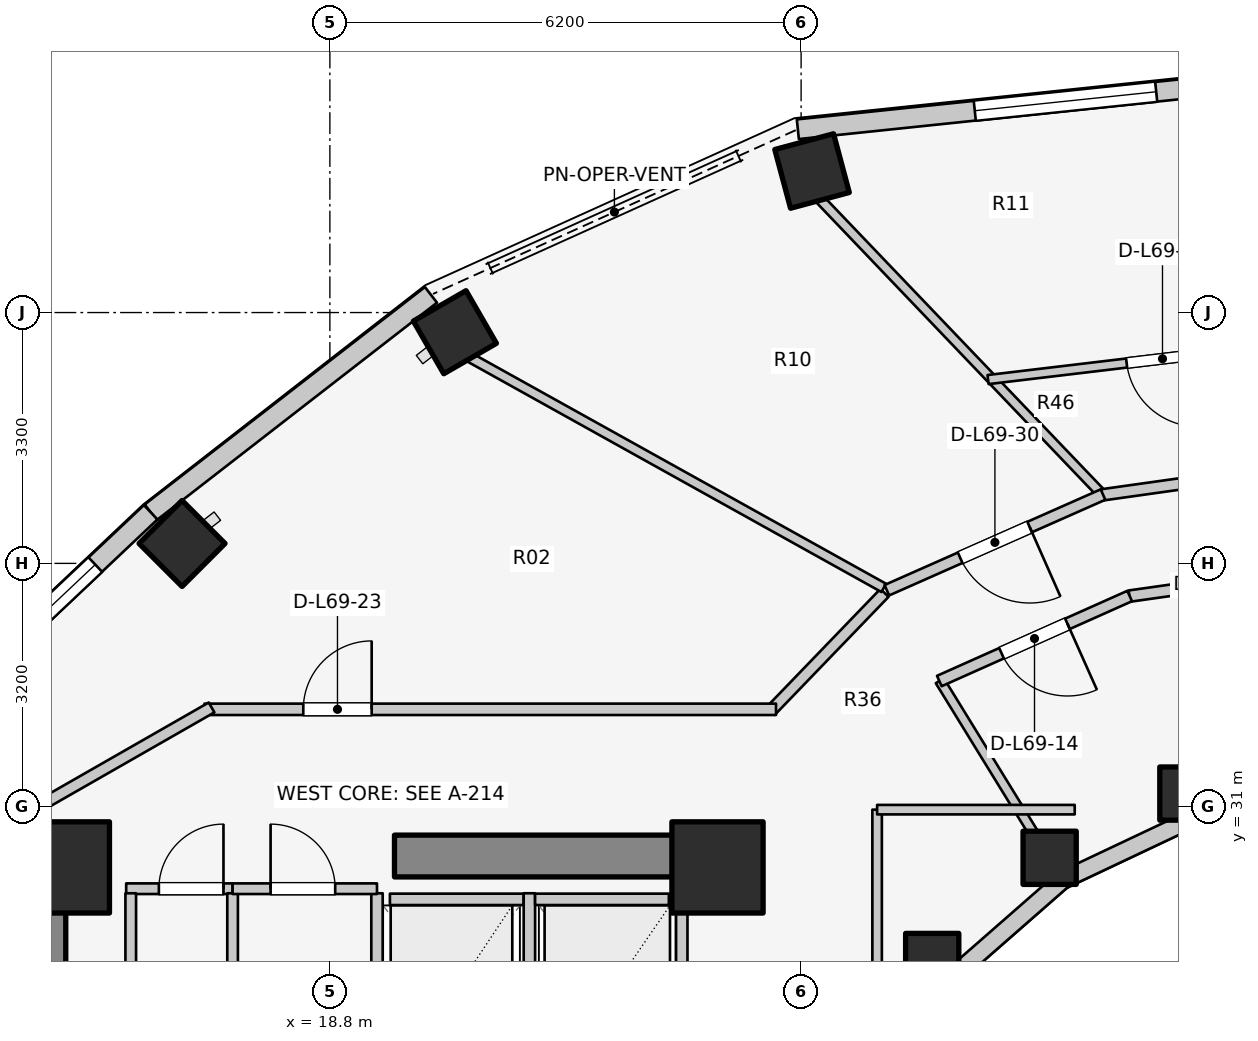
"""IFC4 building model, lengths in metres.
Left out: names, types, materials, properties, quantities, classifications, styles, units other than length and angle.
Written with IfcOpenShell. Run it as: python <this file> out.ifc"""

import sys

from ifc_helpers import new_model, si_unit, direction, frame, frame_2d, origin, origin_2d, place, context, subcontext, project, spatial, rectangle, extrude, element, fill, save


model = new_model("IFC4")
c1 = context("Model", 3, precision=1e-05, world=origin(), true_north=direction((0.0, 1.0)))
c2 = subcontext(c1, "Body", "Model", "MODEL_VIEW")
j1 = project(units=[si_unit("LENGTHUNIT", "METRE"), si_unit("PLANEANGLEUNIT", "RADIAN")], contexts=[c1])
p1 = place(None, origin())
s1 = spatial("IfcSite", under=j1, at=p1, CompositionType="ELEMENT")
p2 = place(p1, origin())
s2 = spatial("IfcBuilding", under=s1, at=p2, CompositionType="ELEMENT")
p3 = place(p2, frame((0.0, 0.0, 226.4)))
s3 = spatial("IfcBuildingStorey", under=s2, at=p3, CompositionType="ELEMENT", Elevation=226.4)
p4 = place(p3, frame((15.05, 17.05, 0.0), z_axis=(0.0, 0.0, 1.0), x_axis=(0.0, 1.0, 0.0)))
e1 = element("IfcWall", 1, at=p4, inside=s3, PredefinedType="SHEAR", context=c2, shape_type="SweptSolid", body=[
    extrude(rectangle(XDim=12.8, YDim=0.55, at=frame_2d((6.4, 0.0))), origin(), (0.0, 0.0, 1.0), 3.1),
])
p5 = place(p3, frame((19.65, 30.35, 0.0), z_axis=(0.0, 0.0, 1.0), x_axis=(1.0, 0.0, 0.0)))
e2 = element("IfcWall", 2, at=p5, inside=s3, PredefinedType="SHEAR", context=c2, shape_type="SweptSolid", body=[
    extrude(rectangle(XDim=4.5, YDim=0.55, at=frame_2d((2.25, 0.0))), origin(), (0.0, 0.0, 1.0), 3.1),
])
for number, where, z_axis, x_axis in (
    (3, (23.9, 30.2, 0.0), (0.0, 0.0, 1.0), (1.0, 0.0, 0.0)),
    (4, (15.3, 30.2, 0.0), (0.0, 0.0, 1.0), (1.0, 0.0, 0.0)),
):
    element("IfcColumn", number, at=place(p3, frame(where, z_axis=z_axis, x_axis=x_axis)), inside=s3, PredefinedType="COLUMN", context=c2, shape_type="SweptSolid", body=[
        extrude(rectangle(XDim=1.2, YDim=1.2, at=origin_2d()), origin(), (0.0, 0.0, 1.0), 3.1),
    ])
p6 = place(p3, frame((30.069, 31.172, 0.0), z_axis=(0.0, 0.0, 1.0), x_axis=(1.0, 0.0, 0.0)))
e5 = element("IfcColumn", 5, at=p6, inside=s3, PredefinedType="COLUMN", context=c2, shape_type="SweptSolid", body=[
    extrude(rectangle(XDim=0.7, YDim=0.7, at=origin_2d()), origin(), (0.0, 0.0, 1.0), 3.1),
])
p7 = place(p3, frame((25.144, 39.362, 0.0), z_axis=(0.0, 0.0, 1.0), x_axis=(-0.258819045103, 0.965925826289, 0.0)))
e6 = element("IfcColumn", 6, at=p7, inside=s3, PredefinedType="COLUMN", context=c2, shape_type="SweptSolid", body=[
    extrude(rectangle(XDim=0.8, YDim=0.8, at=origin_2d()), origin(), (0.0, 0.0, 1.0), 3.1),
])
p8 = place(p3, frame((28.27, 30.327, 0.0), z_axis=(0.0, 0.0, 1.0), x_axis=(1.0, 0.0, 0.0)))
e7 = element("IfcColumn", 7, at=p8, inside=s3, PredefinedType="COLUMN", context=c2, shape_type="SweptSolid", body=[
    extrude(rectangle(XDim=0.7, YDim=0.7, at=origin_2d()), origin(), (0.0, 0.0, 1.0), 3.1),
])
p9 = place(p3, frame((20.445, 37.241, 0.0), z_axis=(0.0, 0.0, 1.0), x_axis=(-0.5, 0.866025403784, 0.0)))
e8 = element("IfcColumn", 8, at=p9, inside=s3, PredefinedType="COLUMN", context=c2, shape_type="SweptSolid", body=[
    extrude(rectangle(XDim=0.8, YDim=0.8, at=origin_2d()), origin(), (0.0, 0.0, 1.0), 3.1),
])
p10 = place(p3, frame((26.725, 28.982, 0.0), z_axis=(0.0, 0.0, 1.0), x_axis=(1.0, 0.0, 0.0)))
e9 = element("IfcColumn", 9, at=p10, inside=s3, PredefinedType="COLUMN", context=c2, shape_type="SweptSolid", body=[
    extrude(rectangle(XDim=0.7, YDim=0.7, at=origin_2d()), origin(), (0.0, 0.0, 1.0), 3.1),
])
p11 = place(p3, frame((16.855, 34.462, 0.0), z_axis=(0.0, 0.0, 1.0), x_axis=(-0.707106781187, 0.707106781187, 0.0)))
e10 = element("IfcColumn", 10, at=p11, inside=s3, PredefinedType="COLUMN", context=c2, shape_type="SweptSolid", body=[
    extrude(rectangle(XDim=0.8, YDim=0.8, at=origin_2d()), origin(), (0.0, 0.0, 1.0), 3.1),
])
p12 = place(p3, frame((30.157, 30.843, 0.0), z_axis=(0.0, 0.0, 1.0), x_axis=(-0.904179699603, -0.427152280606, 0.0)))
e11 = element("IfcWall", 11, at=p12, inside=s3, PredefinedType="STANDARD", context=c2, shape_type="SweptSolid", body=[
    extrude(rectangle(XDim=1.899, YDim=0.23, at=frame_2d((0.95, 0.0))), origin(), (0.0, 0.0, 1.0), 2.16),
])
p13 = place(p3, frame((28.44, 30.032, 0.0), z_axis=(0.0, 0.0, 1.0), x_axis=(-0.752576694707, -0.658504607869, 0.0)))
e12 = element("IfcWall", 12, at=p13, inside=s3, PredefinedType="STANDARD", context=c2, shape_type="SweptSolid", body=[
    extrude(rectangle(XDim=1.959, YDim=0.23, at=frame_2d((0.98, 0.0))), origin(), (0.0, 0.0, 1.0), 2.16),
])
p14 = place(p3, frame((32.0, 40.648, 0.0), z_axis=(0.0, 0.0, 1.0), x_axis=(-0.994582822721, -0.103947144014, 0.0)))
e13 = element("IfcWall", 13, at=p14, inside=s3, PredefinedType="STANDARD", context=c2, shape_type="SweptSolid", body=[
    extrude(rectangle(XDim=7.081, YDim=0.26, at=frame_2d((3.541, 0.0))), origin(), (0.0, 0.0, 1.0), 2.85),
])
p15 = place(p14, frame((2.341, 0.0, 0.75)))
e14 = element("IfcOpeningElement", 14, at=p15, cuts=e13, PredefinedType="OPENING", context=c2, shape_type="SweptSolid", body=[
    extrude(rectangle(XDim=2.4, YDim=1.7, at=frame_2d((1.2, 0.85))), frame((0.0, 0.14, 0.0), z_axis=(0.0, -1.0, 0.0), x_axis=(1.0, 0.0, 0.0)), (0.0, 0.0, 1.0), 0.28),
])
p16 = place(p3, frame((20.13, 37.733, 0.0), z_axis=(0.0, 0.0, 1.0), x_axis=(-0.790126214723, -0.612944177563, 0.0)))
e15 = element("IfcWall", 15, at=p16, inside=s3, PredefinedType="STANDARD", context=c2, shape_type="SweptSolid", body=[
    extrude(rectangle(XDim=4.667, YDim=0.26, at=frame_2d((2.333, 0.0))), origin(), (0.0, 0.0, 1.0), 2.85),
])
p17 = place(p3, frame((16.442, 34.872, 0.0), z_axis=(0.0, 0.0, 1.0), x_axis=(-0.72731899451, -0.686299555752, 0.0)))
e16 = element("IfcWall", 16, at=p17, inside=s3, PredefinedType="STANDARD", context=c2, shape_type="SweptSolid", body=[
    extrude(rectangle(XDim=4.404, YDim=0.26, at=frame_2d((2.202, 0.0))), origin(), (0.0, 0.0, 1.0), 2.85),
])
p18 = place(p17, frame((1.002, 0.0, 0.75)))
e17 = element("IfcOpeningElement", 17, at=p18, cuts=e16, PredefinedType="OPENING", context=c2, shape_type="SweptSolid", body=[
    extrude(rectangle(XDim=2.4, YDim=1.7, at=frame_2d((1.2, 0.85))), frame((0.0, 0.14, 0.0), z_axis=(0.0, -1.0, 0.0), x_axis=(1.0, 0.0, 0.0)), (0.0, 0.0, 1.0), 0.28),
])
p19 = place(p3, frame((19.59, 29.78, 0.0), z_axis=(0.0, 0.0, 1.0), x_axis=(1.0, 0.0, 0.0)))
e18 = element("IfcWall", 18, at=p19, inside=s3, PredefinedType="SOLIDWALL", context=c2, shape_type="SweptSolid", body=[
    extrude(rectangle(XDim=1.76, YDim=0.15, at=frame_2d((0.88, 0.0))), origin(), (0.0, 0.0, 1.0), 2.855),
])
for number, where, z_axis, x_axis in (
    (19, (19.42, 27.14, 0.0), (0.0, 0.0, 1.0), (0.0, 1.0, 0.0)),
    (20, (21.425, 27.14, 0.0), (0.0, 0.0, 1.0), (0.0, 1.0, 0.0)),
):
    element("IfcWall", number, at=place(p3, frame(where, z_axis=z_axis, x_axis=x_axis)), inside=s3, PredefinedType="SOLIDWALL", context=c2, shape_type="SweptSolid", body=[
        extrude(rectangle(XDim=2.72, YDim=0.15, at=frame_2d((1.36, 0.0))), origin(), (0.0, 0.0, 1.0), 2.855),
    ])
p20 = place(p3, frame((21.5, 29.78, 0.0), z_axis=(0.0, 0.0, 1.0), x_axis=(1.0, 0.0, 0.0)))
e21 = element("IfcWall", 21, at=p20, inside=s3, PredefinedType="SOLIDWALL", context=c2, shape_type="SweptSolid", body=[
    extrude(rectangle(XDim=1.76, YDim=0.15, at=frame_2d((0.88, 0.0))), origin(), (0.0, 0.0, 1.0), 2.855),
])
p21 = place(p3, frame((23.43, 27.14, 0.0), z_axis=(0.0, 0.0, 1.0), x_axis=(0.0, 1.0, 0.0)))
e22 = element("IfcWall", 22, at=p21, inside=s3, PredefinedType="SOLIDWALL", context=c2, shape_type="SweptSolid", body=[
    extrude(rectangle(XDim=2.72, YDim=0.15, at=frame_2d((1.36, 0.0))), origin(), (0.0, 0.0, 1.0), 2.855),
])
p22 = place(p3, frame((16.12, 29.92, 0.0), z_axis=(0.0, 0.0, 1.0), x_axis=(1.0, 0.0, 0.0)))
e23 = element("IfcWall", 23, at=p22, inside=s3, PredefinedType="PLUMBINGWALL", context=c2, shape_type="SweptSolid", body=[
    extrude(rectangle(XDim=1.4, YDim=0.14, at=frame_2d((0.7, 0.0))), origin(), (0.0, 0.0, 1.0), 2.855),
])
p23 = place(p22, frame((0.43, 0.0, 0.0)))
e24 = element("IfcOpeningElement", 24, at=p23, cuts=e23, PredefinedType="OPENING", context=c2, shape_type="SweptSolid", body=[
    extrude(rectangle(XDim=0.85, YDim=2.05, at=frame_2d((0.425, 1.025))), frame((0.0, 0.08, 0.0), z_axis=(0.0, -1.0, 0.0), x_axis=(1.0, 0.0, 0.0)), (0.0, 0.0, 1.0), 0.16),
])
for number, where, z_axis, x_axis in (
    (25, (16.18, 25.98, 0.0), (0.0, 0.0, 1.0), (0.0, 1.0, 0.0)),
    (26, (17.52, 25.98, 0.0), (0.0, 0.0, 1.0), (0.0, 1.0, 0.0)),
):
    element("IfcWall", number, at=place(p3, frame(where, z_axis=z_axis, x_axis=x_axis)), inside=s3, PredefinedType="PLUMBINGWALL", context=c2, shape_type="SweptSolid", body=[
        extrude(rectangle(XDim=3.88, YDim=0.14, at=frame_2d((1.94, 0.0))), origin(), (0.0, 0.0, 1.0), 2.855),
    ])
p24 = place(p3, frame((17.52, 29.92, 0.0), z_axis=(0.0, 0.0, 1.0), x_axis=(1.0, 0.0, 0.0)))
e27 = element("IfcWall", 27, at=p24, inside=s3, PredefinedType="PLUMBINGWALL", context=c2, shape_type="SweptSolid", body=[
    extrude(rectangle(XDim=1.9, YDim=0.14, at=frame_2d((0.95, 0.0))), origin(), (0.0, 0.0, 1.0), 2.855),
])
p25 = place(p24, frame((0.5, 0.0, 0.0)))
e28 = element("IfcOpeningElement", 28, at=p25, cuts=e27, PredefinedType="OPENING", context=c2, shape_type="SweptSolid", body=[
    extrude(rectangle(XDim=0.85, YDim=2.05, at=frame_2d((0.425, 1.025))), frame((0.0, 0.08, 0.0), z_axis=(0.0, -1.0, 0.0), x_axis=(1.0, 0.0, 0.0)), (0.0, 0.0, 1.0), 0.16),
])
p26 = place(p3, frame((28.45, 30.015, 0.0), z_axis=(0.0, 0.0, 1.0), x_axis=(-0.523992004803, 0.851723182086, 0.0)))
e29 = element("IfcWall", 29, at=p26, inside=s3, PredefinedType="PARTITIONING", context=c2, shape_type="SweptSolid", body=[
    extrude(rectangle(XDim=3.101, YDim=0.125, at=frame_2d((1.551, 0.0))), origin(), (0.0, 0.0, 1.0), 2.376),
])
p27 = place(p3, frame((32.007, 34.15, 0.0), z_axis=(0.0, 0.0, 1.0), x_axis=(-0.990132151456, -0.140136799779, 0.0)))
e30 = element("IfcWall", 30, at=p27, inside=s3, PredefinedType="PARTITIONING", context=c2, shape_type="SweptSolid", body=[
    extrude(rectangle(XDim=2.714, YDim=0.15, at=frame_2d((1.357, 0.0))), origin(), (0.0, 0.0, 1.0), 2.376),
])
p28 = place(p3, frame((29.323, 33.771, 0.0), z_axis=(0.0, 0.0, 1.0), x_axis=(-0.913120130558, -0.407690602257, 0.0)))
e31 = element("IfcWall", 31, at=p28, inside=s3, PredefinedType="PARTITIONING", context=c2, shape_type="SweptSolid", body=[
    extrude(rectangle(XDim=2.743, YDim=0.15, at=frame_2d((1.371, 0.0))), origin(), (0.0, 0.0, 1.0), 2.376),
])
p29 = place(p28, frame((0.896, 0.0, 0.0)))
e32 = element("IfcOpeningElement", 32, at=p29, cuts=e31, PredefinedType="OPENING", context=c2, shape_type="SweptSolid", body=[
    extrude(rectangle(XDim=0.95, YDim=2.1, at=frame_2d((0.475, 1.05))), frame((0.0, 0.085, 0.0), z_axis=(0.0, -1.0, 0.0), x_axis=(1.0, 0.0, 0.0)), (0.0, 0.0, 1.0), 0.17),
])
p30 = place(p3, frame((26.0, 25.8, 0.0), z_axis=(0.0, 0.0, 1.0), x_axis=(0.0, 1.0, 0.0)))
e33 = element("IfcWall", 33, at=p30, inside=s3, PredefinedType="PARTITIONING", context=c2, shape_type="SweptSolid", body=[
    extrude(rectangle(XDim=5.16, YDim=0.125, at=frame_2d((2.58, 0.0))), origin(), (0.0, 0.0, 1.0), 2.232),
])
p31 = place(p3, frame((26.0, 30.96, 0.0), z_axis=(0.0, 0.0, 1.0), x_axis=(1.0, 0.0, 0.0)))
e34 = element("IfcWall", 34, at=p31, inside=s3, PredefinedType="PARTITIONING", context=c2, shape_type="SweptSolid", body=[
    extrude(rectangle(XDim=2.6, YDim=0.125, at=frame_2d((1.3, 0.0))), origin(), (0.0, 0.0, 1.0), 2.376),
])
p32 = place(p3, frame((26.097, 33.812, 0.0), z_axis=(0.0, 0.0, 1.0), x_axis=(-0.694032962553, -0.719943224768, 0.0)))
e35 = element("IfcWall", 35, at=p32, inside=s3, PredefinedType="PARTITIONING", context=c2, shape_type="SweptSolid", body=[
    extrude(rectangle(XDim=2.158, YDim=0.15, at=frame_2d((1.079, 0.0))), origin(), (0.0, 0.0, 1.0), 2.376),
])
p33 = place(p3, frame((17.15, 32.28, 0.0), z_axis=(0.0, 0.0, 1.0), x_axis=(1.0, 0.0, 0.0)))
e36 = element("IfcWall", 36, at=p33, inside=s3, PredefinedType="PARTITIONING", context=c2, shape_type="SweptSolid", body=[
    extrude(rectangle(XDim=7.52, YDim=0.15, at=frame_2d((3.76, 0.0))), origin(), (0.0, 0.0, 1.0), 2.376),
])
p34 = place(p33, frame((1.3, 0.0, 0.0)))
e37 = element("IfcOpeningElement", 37, at=p34, cuts=e36, PredefinedType="OPENING", context=c2, shape_type="SweptSolid", body=[
    extrude(rectangle(XDim=0.9, YDim=2.1, at=frame_2d((0.45, 1.05))), frame((0.0, 0.085, 0.0), z_axis=(0.0, -1.0, 0.0), x_axis=(1.0, 0.0, 0.0)), (0.0, 0.0, 1.0), 0.17),
])
p35 = place(p3, frame((17.243, 32.305, 0.0), z_axis=(0.0, 0.0, 1.0), x_axis=(-0.867991349648, -0.496579315857, 0.0)))
e38 = element("IfcWall", 38, at=p35, inside=s3, PredefinedType="PARTITIONING", context=c2, shape_type="SweptSolid", body=[
    extrude(rectangle(XDim=2.567, YDim=0.15, at=frame_2d((1.283, 0.0))), origin(), (0.0, 0.0, 1.0), 2.22),
])
p36 = place(p3, frame((28.926, 35.143, 0.0), z_axis=(0.0, 0.0, 1.0), x_axis=(-0.691128003726, 0.722732372642, 0.0)))
e39 = element("IfcWall", 39, at=p36, inside=s3, PredefinedType="PARTITIONING", context=c2, shape_type="SweptSolid", body=[
    extrude(rectangle(XDim=5.33, YDim=0.125, at=frame_2d((2.665, 0.0))), origin(), (0.0, 0.0, 1.0), 2.376),
])
p37 = place(p3, frame((26.087, 33.878, 0.0), z_axis=(0.0, 0.0, 1.0), x_axis=(-0.87377679808, 0.486327160599, 0.0)))
e40 = element("IfcWall", 40, at=p37, inside=s3, PredefinedType="PARTITIONING", context=c2, shape_type="SweptSolid", body=[
    extrude(rectangle(XDim=6.24, YDim=0.125, at=frame_2d((3.12, 0.0))), origin(), (0.0, 0.0, 1.0), 2.376),
])
p38 = place(p3, frame((32.05, 37.166, 0.0), z_axis=(0.0, 0.0, 1.0), x_axis=(-0.992963303559, -0.118422454736, 0.0)))
e41 = element("IfcWall", 41, at=p38, inside=s3, PredefinedType="MOVABLE", context=c2, shape_type="SweptSolid", body=[
    extrude(rectangle(XDim=4.622, YDim=0.12, at=frame_2d((2.311, 0.0))), origin(), (0.0, 0.0, 1.0), 2.376),
])
p39 = place(p38, frame((1.836, 0.0, 0.0)))
e42 = element("IfcOpeningElement", 42, at=p39, cuts=e41, PredefinedType="OPENING", context=c2, shape_type="SweptSolid", body=[
    extrude(rectangle(XDim=0.95, YDim=2.1, at=frame_2d((0.475, 1.05))), frame((0.0, 0.07, 0.0), z_axis=(0.0, -1.0, 0.0), x_axis=(1.0, 0.0, 0.0)), (0.0, 0.0, 1.0), 0.14),
])
p40 = place(p3, frame((32.008, 35.53, 0.0), z_axis=(0.0, 0.0, 1.0), x_axis=(-0.990257602807, -0.139247549651, 0.0)))
e43 = element("IfcWall", 43, at=p40, inside=s3, PredefinedType="PARTITIONING", context=c2, shape_type="SweptSolid", body=[
    extrude(rectangle(XDim=3.082, YDim=0.15, at=frame_2d((1.541, 0.0))), origin(), (0.0, 0.0, 1.0), 2.376),
])
p41 = place(p40, frame((1.041, 0.0, 0.0)))
e44 = element("IfcOpeningElement", 44, at=p41, cuts=e43, PredefinedType="OPENING", context=c2, shape_type="SweptSolid", body=[
    extrude(rectangle(XDim=1.0, YDim=2.1, at=frame_2d((0.5, 1.05))), frame((0.0, 0.085, 0.0), z_axis=(0.0, -1.0, 0.0), x_axis=(1.0, 0.0, 0.0)), (0.0, 0.0, 1.0), 0.17),
])
p42 = place(p3, frame((28.972, 35.105, 0.0), z_axis=(0.0, 0.0, 1.0), x_axis=(-0.914490094652, -0.40460828808, 0.0)))
e45 = element("IfcWall", 45, at=p42, inside=s3, PredefinedType="PARTITIONING", context=c2, shape_type="SweptSolid", body=[
    extrude(rectangle(XDim=3.11, YDim=0.15, at=frame_2d((1.555, 0.0))), origin(), (0.0, 0.0, 1.0), 2.376),
])
p43 = place(p42, frame((1.055, 0.0, 0.0)))
e46 = element("IfcOpeningElement", 46, at=p43, cuts=e45, PredefinedType="OPENING", context=c2, shape_type="SweptSolid", body=[
    extrude(rectangle(XDim=1.0, YDim=2.1, at=frame_2d((0.5, 1.05))), frame((0.0, 0.085, 0.0), z_axis=(0.0, -1.0, 0.0), x_axis=(1.0, 0.0, 0.0)), (0.0, 0.0, 1.0), 0.17),
])
p44 = place(p15, origin())
e47 = element("IfcWindow", 47, at=p44, inside=s3, PartitioningType="SINGLE_PANEL", PredefinedType="WINDOW", context=c2, shape_type="SweptSolid", body=[
    extrude(rectangle(XDim=2.4, YDim=1.7, at=frame_2d((1.2, 0.85))), frame((0.0, 0.03, 0.0), z_axis=(0.0, -1.0, 0.0), x_axis=(1.0, 0.0, 0.0)), (0.0, 0.0, 1.0), 0.06),
])
fill(e14, e47)
p45 = place(p18, origin())
e48 = element("IfcWindow", 48, at=p45, inside=s3, PartitioningType="SINGLE_PANEL", PredefinedType="WINDOW", context=c2, shape_type="SweptSolid", body=[
    extrude(rectangle(XDim=2.4, YDim=1.7, at=frame_2d((1.2, 0.85))), frame((0.0, 0.03, 0.0), z_axis=(0.0, -1.0, 0.0), x_axis=(1.0, 0.0, 0.0)), (0.0, 0.0, 1.0), 0.06),
])
fill(e17, e48)
p46 = place(p23, origin())
e49 = element("IfcDoor", 49, at=p46, inside=s3, OperationType="SINGLE_SWING_RIGHT", PredefinedType="DOOR", context=c2, shape_type="SweptSolid", body=[
    extrude(rectangle(XDim=0.85, YDim=2.05, at=frame_2d((0.425, 1.025))), frame((0.0, 0.025, 0.0), z_axis=(0.0, -1.0, 0.0), x_axis=(1.0, 0.0, 0.0)), (0.0, 0.0, 1.0), 0.05),
])
fill(e24, e49)
p47 = place(p25, origin())
e50 = element("IfcDoor", 50, at=p47, inside=s3, OperationType="SINGLE_SWING_LEFT", PredefinedType="DOOR", context=c2, shape_type="SweptSolid", body=[
    extrude(rectangle(XDim=0.85, YDim=2.05, at=frame_2d((0.425, 1.025))), frame((0.0, 0.025, 0.0), z_axis=(0.0, -1.0, 0.0), x_axis=(1.0, 0.0, 0.0)), (0.0, 0.0, 1.0), 0.05),
])
fill(e28, e50)
p48 = place(p29, origin())
e51 = element("IfcDoor", 51, at=p48, inside=s3, OperationType="SINGLE_SWING_LEFT", PredefinedType="DOOR", context=c2, shape_type="SweptSolid", body=[
    extrude(rectangle(XDim=0.95, YDim=2.1, at=frame_2d((0.475, 1.05))), frame((0.0, 0.025, 0.0), z_axis=(0.0, -1.0, 0.0), x_axis=(1.0, 0.0, 0.0)), (0.0, 0.0, 1.0), 0.05),
])
fill(e32, e51)
p49 = place(p34, origin())
e52 = element("IfcDoor", 52, at=p49, inside=s3, OperationType="SINGLE_SWING_RIGHT", PredefinedType="DOOR", context=c2, shape_type="SweptSolid", body=[
    extrude(rectangle(XDim=0.9, YDim=2.1, at=frame_2d((0.45, 1.05))), frame((0.0, 0.025, 0.0), z_axis=(0.0, -1.0, 0.0), x_axis=(1.0, 0.0, 0.0)), (0.0, 0.0, 1.0), 0.05),
])
fill(e37, e52)
p50 = place(p39, origin())
e53 = element("IfcDoor", 53, at=p50, inside=s3, OperationType="SINGLE_SWING_LEFT", PredefinedType="DOOR", context=c2, shape_type="SweptSolid", body=[
    extrude(rectangle(XDim=0.95, YDim=2.1, at=frame_2d((0.475, 1.05))), frame((0.0, 0.025, 0.0), z_axis=(0.0, -1.0, 0.0), x_axis=(1.0, 0.0, 0.0)), (0.0, 0.0, 1.0), 0.05),
])
fill(e42, e53)
p51 = place(p43, origin())
e54 = element("IfcDoor", 54, at=p51, inside=s3, OperationType="SINGLE_SWING_LEFT", PredefinedType="DOOR", context=c2, shape_type="SweptSolid", body=[
    extrude(rectangle(XDim=1.0, YDim=2.1, at=frame_2d((0.5, 1.05))), frame((0.0, 0.025, 0.0), z_axis=(0.0, -1.0, 0.0), x_axis=(1.0, 0.0, 0.0)), (0.0, 0.0, 1.0), 0.05),
])
fill(e46, e54)
save(model, sys.argv[1])
